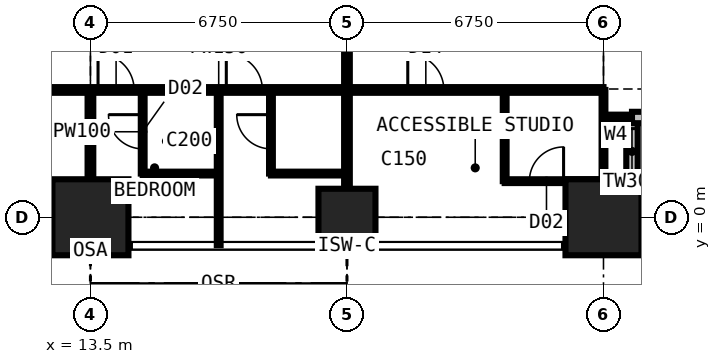
"""IFC4 building model, lengths in metres.
Left out: names, types, materials, properties, quantities, classifications, styles, units other than length and angle.
Written with IfcOpenShell. Run it as: python <this file> out.ifc"""

import sys

from ifc_helpers import new_model, si_unit, direction, frame, frame_2d, origin, origin_2d, place, context, subcontext, project, spatial, rectangle, extrude, element, fill, save


model = new_model("IFC4")
c1 = context("Model", 3, precision=1e-05, world=origin(), true_north=direction((0.0, 1.0)))
c2 = subcontext(c1, "Body", "Model", "MODEL_VIEW")
j1 = project(units=[si_unit("LENGTHUNIT", "METRE"), si_unit("PLANEANGLEUNIT", "RADIAN")], contexts=[c1])
p1 = place(None, origin())
s1 = spatial("IfcSite", under=j1, at=p1, CompositionType="ELEMENT")
p2 = place(p1, origin())
s2 = spatial("IfcBuilding", under=s1, at=p2, CompositionType="ELEMENT")
p3 = place(p2, frame((0.0, 0.0, 145.8)))
s3 = spatial("IfcBuildingStorey", under=s2, at=p3, CompositionType="ELEMENT", Elevation=145.8)
p4 = place(p3, frame((13.5, 0.0, 0.0), z_axis=(0.0, 0.0, 1.0), x_axis=(1.0, 0.0, 0.0)))
e1 = element("IfcColumn", 1, at=p4, inside=s3, PredefinedType="COLUMN", context=c2, shape_type="SweptSolid", body=[
    extrude(rectangle(XDim=2.0, YDim=2.0, at=origin_2d()), origin(), (0.0, 0.0, 1.0), 3.6),
])
p5 = place(p3, frame((20.25, 0.0, 0.0), z_axis=(0.0, 0.0, 1.0), x_axis=(1.0, 0.0, 0.0)))
e2 = element("IfcColumn", 2, at=p5, inside=s3, PredefinedType="COLUMN", context=c2, shape_type="SweptSolid", body=[
    extrude(rectangle(XDim=1.5, YDim=1.5, at=origin_2d()), origin(), (0.0, 0.0, 1.0), 3.6),
])
p6 = place(p3, frame((27.0, 0.0, 0.0), z_axis=(0.0, 0.0, 1.0), x_axis=(1.0, 0.0, 0.0)))
e3 = element("IfcColumn", 3, at=p6, inside=s3, PredefinedType="COLUMN", context=c2, shape_type="SweptSolid", body=[
    extrude(rectangle(XDim=2.0, YDim=2.0, at=origin_2d()), origin(), (0.0, 0.0, 1.0), 3.6),
])
p7 = place(p3, frame((27.75, -0.75, 0.0), z_axis=(0.0, 0.0, 1.0), x_axis=(0.0, 1.0, 0.0)))
e4 = element("IfcWall", 4, at=p7, inside=s3, PredefinedType="SOLIDWALL", context=c2, shape_type="SweptSolid", body=[
    extrude(rectangle(XDim=3.375, YDim=0.3, at=frame_2d((1.688, 0.0))), origin(), (0.0, 0.0, 1.0), 3.375),
])
p8 = place(p7, frame((1.883, 0.0, 0.9)))
e5 = element("IfcOpeningElement", 5, at=p8, cuts=e4, PredefinedType="OPENING", context=c2, shape_type="SweptSolid", body=[
    extrude(rectangle(XDim=1.2, YDim=1.8, at=frame_2d((0.6, 0.9))), frame((0.0, 0.16, 0.0), z_axis=(0.0, -1.0, 0.0), x_axis=(1.0, 0.0, 0.0)), (0.0, 0.0, 1.0), 0.32),
])
p9 = place(p3, frame((27.75, 2.625, 0.0), z_axis=(0.0, 0.0, 1.0), x_axis=(1.0, 0.0, 0.0)))
e6 = element("IfcWall", 6, at=p9, inside=s3, PredefinedType="SOLIDWALL", context=c2, shape_type="SweptSolid", body=[
    extrude(rectangle(XDim=3.375, YDim=0.3, at=frame_2d((1.688, 0.0))), origin(), (0.0, 0.0, 1.0), 3.375),
])
p10 = place(p9, frame((0.788, 0.0, 0.6)))
e7 = element("IfcOpeningElement", 7, at=p10, cuts=e6, PredefinedType="OPENING", context=c2, shape_type="SweptSolid", body=[
    extrude(rectangle(XDim=1.8, YDim=2.1, at=frame_2d((0.9, 1.05))), frame((0.0, 0.16, 0.0), z_axis=(0.0, -1.0, 0.0), x_axis=(1.0, 0.0, 0.0)), (0.0, 0.0, 1.0), 0.32),
])
p11 = place(p3, frame((6.75, 3.35, 0.0), z_axis=(0.0, 0.0, 1.0), x_axis=(1.0, 0.0, 0.0)))
e8 = element("IfcWall", 8, at=p11, inside=s3, PredefinedType="PARTITIONING", context=c2, shape_type="SweptSolid", body=[
    extrude(rectangle(XDim=20.25, YDim=0.15, at=frame_2d((10.125, 0.0))), origin(), (0.0, 0.0, 1.0), 3.375),
])
p12 = place(p11, frame((2.85, 0.0, 0.0)))
e9 = element("IfcOpeningElement", 9, at=p12, cuts=e8, PredefinedType="OPENING", context=c2, shape_type="SweptSolid", body=[
    extrude(rectangle(XDim=1.0, YDim=2.2, at=frame_2d((0.5, 1.1))), frame((0.0, 0.085, 0.0), z_axis=(0.0, -1.0, 0.0), x_axis=(1.0, 0.0, 0.0)), (0.0, 0.0, 1.0), 0.17),
])
p13 = place(p11, frame((6.95, 0.0, 0.0)))
e10 = element("IfcOpeningElement", 10, at=p13, cuts=e8, PredefinedType="OPENING", context=c2, shape_type="SweptSolid", body=[
    extrude(rectangle(XDim=0.95, YDim=2.2, at=frame_2d((0.475, 1.1))), frame((0.0, 0.085, 0.0), z_axis=(0.0, -1.0, 0.0), x_axis=(1.0, 0.0, 0.0)), (0.0, 0.0, 1.0), 0.17),
])
p14 = place(p11, frame((10.325, 0.0, 0.0)))
e11 = element("IfcOpeningElement", 11, at=p14, cuts=e8, PredefinedType="OPENING", context=c2, shape_type="SweptSolid", body=[
    extrude(rectangle(XDim=0.95, YDim=2.2, at=frame_2d((0.475, 1.1))), frame((0.0, 0.085, 0.0), z_axis=(0.0, -1.0, 0.0), x_axis=(1.0, 0.0, 0.0)), (0.0, 0.0, 1.0), 0.17),
])
p15 = place(p11, frame((15.1, 0.0, 0.0)))
e12 = element("IfcOpeningElement", 12, at=p15, cuts=e8, PredefinedType="OPENING", context=c2, shape_type="SweptSolid", body=[
    extrude(rectangle(XDim=0.95, YDim=2.2, at=frame_2d((0.475, 1.1))), frame((0.0, 0.085, 0.0), z_axis=(0.0, -1.0, 0.0), x_axis=(1.0, 0.0, 0.0)), (0.0, 0.0, 1.0), 0.17),
])
p16 = place(p3, frame((13.5, -0.734, 0.0), z_axis=(0.0, 0.0, 1.0), x_axis=(0.0, 1.0, 0.0)))
e13 = element("IfcWall", 13, at=p16, inside=s3, PredefinedType="PARTITIONING", context=c2, shape_type="SweptSolid", body=[
    extrude(rectangle(XDim=4.084, YDim=0.15, at=frame_2d((2.042, 0.0))), origin(), (0.0, 0.0, 1.0), 2.61),
])
p17 = place(p3, frame((14.875, 1.15, 0.0), z_axis=(0.0, 0.0, 1.0), x_axis=(0.0, 1.0, 0.0)))
e14 = element("IfcWall", 14, at=p17, inside=s3, PredefinedType="PARTITIONING", context=c2, shape_type="SweptSolid", body=[
    extrude(rectangle(XDim=2.2, YDim=0.1, at=frame_2d((1.1, 0.0))), origin(), (0.0, 0.0, 1.0), 3.375),
])
p18 = place(p17, frame((0.65, 0.0, 0.0)))
e15 = element("IfcOpeningElement", 15, at=p18, cuts=e14, PredefinedType="OPENING", context=c2, shape_type="SweptSolid", body=[
    extrude(rectangle(XDim=0.9, YDim=2.2, at=frame_2d((0.45, 1.1))), frame((0.0, 0.06, 0.0), z_axis=(0.0, -1.0, 0.0), x_axis=(1.0, 0.0, 0.0)), (0.0, 0.0, 1.0), 0.12),
])
p19 = place(p3, frame((14.875, 1.15, 0.0), z_axis=(0.0, 0.0, 1.0), x_axis=(1.0, 0.0, 0.0)))
e16 = element("IfcWall", 16, at=p19, inside=s3, PredefinedType="PARTITIONING", context=c2, shape_type="SweptSolid", body=[
    extrude(rectangle(XDim=2.0, YDim=0.1, at=frame_2d((1.0, 0.0))), origin(), (0.0, 0.0, 1.0), 3.375),
])
p20 = place(p3, frame((16.875, -0.734, 0.0), z_axis=(0.0, 0.0, 1.0), x_axis=(0.0, 1.0, 0.0)))
e17 = element("IfcWall", 17, at=p20, inside=s3, PredefinedType="PARTITIONING", context=c2, shape_type="SweptSolid", body=[
    extrude(rectangle(XDim=4.084, YDim=0.1, at=frame_2d((2.042, 0.0))), origin(), (0.0, 0.0, 1.0), 3.375),
])
p21 = place(p3, frame((18.25, 1.15, 0.0), z_axis=(0.0, 0.0, 1.0), x_axis=(0.0, 1.0, 0.0)))
e18 = element("IfcWall", 18, at=p21, inside=s3, PredefinedType="PARTITIONING", context=c2, shape_type="SweptSolid", body=[
    extrude(rectangle(XDim=2.2, YDim=0.1, at=frame_2d((1.1, 0.0))), origin(), (0.0, 0.0, 1.0), 3.375),
])
p22 = place(p21, frame((0.65, 0.0, 0.0)))
e19 = element("IfcOpeningElement", 19, at=p22, cuts=e18, PredefinedType="OPENING", context=c2, shape_type="SweptSolid", body=[
    extrude(rectangle(XDim=0.9, YDim=2.2, at=frame_2d((0.45, 1.1))), frame((0.0, 0.06, 0.0), z_axis=(0.0, -1.0, 0.0), x_axis=(1.0, 0.0, 0.0)), (0.0, 0.0, 1.0), 0.12),
])
p23 = place(p3, frame((18.25, 1.15, 0.0), z_axis=(0.0, 0.0, 1.0), x_axis=(1.0, 0.0, 0.0)))
e20 = element("IfcWall", 20, at=p23, inside=s3, PredefinedType="PARTITIONING", context=c2, shape_type="SweptSolid", body=[
    extrude(rectangle(XDim=2.0, YDim=0.1, at=frame_2d((1.0, 0.0))), origin(), (0.0, 0.0, 1.0), 3.375),
])
p24 = place(p3, frame((20.25, -0.734, 0.0), z_axis=(0.0, 0.0, 1.0), x_axis=(0.0, 1.0, 0.0)))
e21 = element("IfcWall", 21, at=p24, inside=s3, PredefinedType="PARTITIONING", context=c2, shape_type="SweptSolid", body=[
    extrude(rectangle(XDim=12.034, YDim=0.15, at=frame_2d((6.017, 0.0))), origin(), (0.0, 0.0, 1.0), 2.61),
])
p25 = place(p3, frame((24.4, 0.95, 0.0), z_axis=(0.0, 0.0, 1.0), x_axis=(0.0, 1.0, 0.0)))
e22 = element("IfcWall", 22, at=p25, inside=s3, PredefinedType="PARTITIONING", context=c2, shape_type="SweptSolid", body=[
    extrude(rectangle(XDim=2.4, YDim=0.1, at=frame_2d((1.2, 0.0))), origin(), (0.0, 0.0, 1.0), 3.375),
])
p26 = place(p3, frame((24.4, 0.95, 0.0), z_axis=(0.0, 0.0, 1.0), x_axis=(1.0, 0.0, 0.0)))
e23 = element("IfcWall", 23, at=p26, inside=s3, PredefinedType="PARTITIONING", context=c2, shape_type="SweptSolid", body=[
    extrude(rectangle(XDim=2.6, YDim=0.1, at=frame_2d((1.3, 0.0))), origin(), (0.0, 0.0, 1.0), 3.375),
])
p27 = place(p26, frame((0.65, 0.0, 0.0)))
e24 = element("IfcOpeningElement", 24, at=p27, cuts=e23, PredefinedType="OPENING", context=c2, shape_type="SweptSolid", body=[
    extrude(rectangle(XDim=0.9, YDim=2.2, at=frame_2d((0.45, 1.1))), frame((0.0, 0.06, 0.0), z_axis=(0.0, -1.0, 0.0), x_axis=(1.0, 0.0, 0.0)), (0.0, 0.0, 1.0), 0.12),
])
p28 = place(p3, frame((27.0, -0.734, 0.0), z_axis=(0.0, 0.0, 1.0), x_axis=(0.0, 1.0, 0.0)))
e25 = element("IfcWall", 25, at=p28, inside=s3, PredefinedType="PARTITIONING", context=c2, shape_type="SweptSolid", body=[
    extrude(rectangle(XDim=4.084, YDim=0.1, at=frame_2d((2.042, 0.0))), origin(), (0.0, 0.0, 1.0), 2.877),
])
p29 = place(p3, frame((27.0, 2.625, 0.0), z_axis=(0.0, 0.0, 1.0), x_axis=(1.0, 0.0, 0.0)))
e26 = element("IfcWall", 26, at=p29, inside=s3, PredefinedType="PARTITIONING", context=c2, shape_type="SweptSolid", body=[
    extrude(rectangle(XDim=0.734, YDim=0.15, at=frame_2d((0.367, 0.0))), origin(), (0.0, 0.0, 1.0), 3.375),
])
p30 = place(p8, origin())
e27 = element("IfcWindow", 27, at=p30, inside=s3, PartitioningType="SINGLE_PANEL", PredefinedType="WINDOW", context=c2, shape_type="SweptSolid", body=[
    extrude(rectangle(XDim=1.2, YDim=1.8, at=frame_2d((0.6, 0.9))), frame((0.0, 0.03, 0.0), z_axis=(0.0, -1.0, 0.0), x_axis=(1.0, 0.0, 0.0)), (0.0, 0.0, 1.0), 0.06),
])
fill(e5, e27)
p31 = place(p13, origin())
e28 = element("IfcDoor", 28, at=p31, inside=s3, OperationType="SINGLE_SWING_LEFT", PredefinedType="DOOR", context=c2, shape_type="SweptSolid", body=[
    extrude(rectangle(XDim=0.95, YDim=2.2, at=frame_2d((0.475, 1.1))), frame((0.0, 0.025, 0.0), z_axis=(0.0, -1.0, 0.0), x_axis=(1.0, 0.0, 0.0)), (0.0, 0.0, 1.0), 0.05),
])
fill(e10, e28)
p32 = place(p18, origin())
e29 = element("IfcDoor", 29, at=p32, inside=s3, OperationType="SINGLE_SWING_RIGHT", PredefinedType="DOOR", context=c2, shape_type="SweptSolid", body=[
    extrude(rectangle(XDim=0.9, YDim=2.2, at=frame_2d((0.45, 1.1))), frame((0.0, 0.025, 0.0), z_axis=(0.0, -1.0, 0.0), x_axis=(1.0, 0.0, 0.0)), (0.0, 0.0, 1.0), 0.05),
])
fill(e15, e29)
p33 = place(p14, origin())
e30 = element("IfcDoor", 30, at=p33, inside=s3, OperationType="SINGLE_SWING_LEFT", PredefinedType="DOOR", context=c2, shape_type="SweptSolid", body=[
    extrude(rectangle(XDim=0.95, YDim=2.2, at=frame_2d((0.475, 1.1))), frame((0.0, 0.025, 0.0), z_axis=(0.0, -1.0, 0.0), x_axis=(1.0, 0.0, 0.0)), (0.0, 0.0, 1.0), 0.05),
])
fill(e11, e30)
p34 = place(p22, origin())
e31 = element("IfcDoor", 31, at=p34, inside=s3, OperationType="SINGLE_SWING_RIGHT", PredefinedType="DOOR", context=c2, shape_type="SweptSolid", body=[
    extrude(rectangle(XDim=0.9, YDim=2.2, at=frame_2d((0.45, 1.1))), frame((0.0, 0.025, 0.0), z_axis=(0.0, -1.0, 0.0), x_axis=(1.0, 0.0, 0.0)), (0.0, 0.0, 1.0), 0.05),
])
fill(e19, e31)
p35 = place(p15, origin())
e32 = element("IfcDoor", 32, at=p35, inside=s3, OperationType="SINGLE_SWING_LEFT", PredefinedType="DOOR", context=c2, shape_type="SweptSolid", body=[
    extrude(rectangle(XDim=0.95, YDim=2.2, at=frame_2d((0.475, 1.1))), frame((0.0, 0.025, 0.0), z_axis=(0.0, -1.0, 0.0), x_axis=(1.0, 0.0, 0.0)), (0.0, 0.0, 1.0), 0.05),
])
fill(e12, e32)
p36 = place(p27, origin())
e33 = element("IfcDoor", 33, at=p36, inside=s3, OperationType="SINGLE_SWING_RIGHT", PredefinedType="DOOR", context=c2, shape_type="SweptSolid", body=[
    extrude(rectangle(XDim=0.9, YDim=2.2, at=frame_2d((0.45, 1.1))), frame((0.0, 0.025, 0.0), z_axis=(0.0, -1.0, 0.0), x_axis=(1.0, 0.0, 0.0)), (0.0, 0.0, 1.0), 0.05),
])
fill(e24, e33)
save(model, sys.argv[1])
